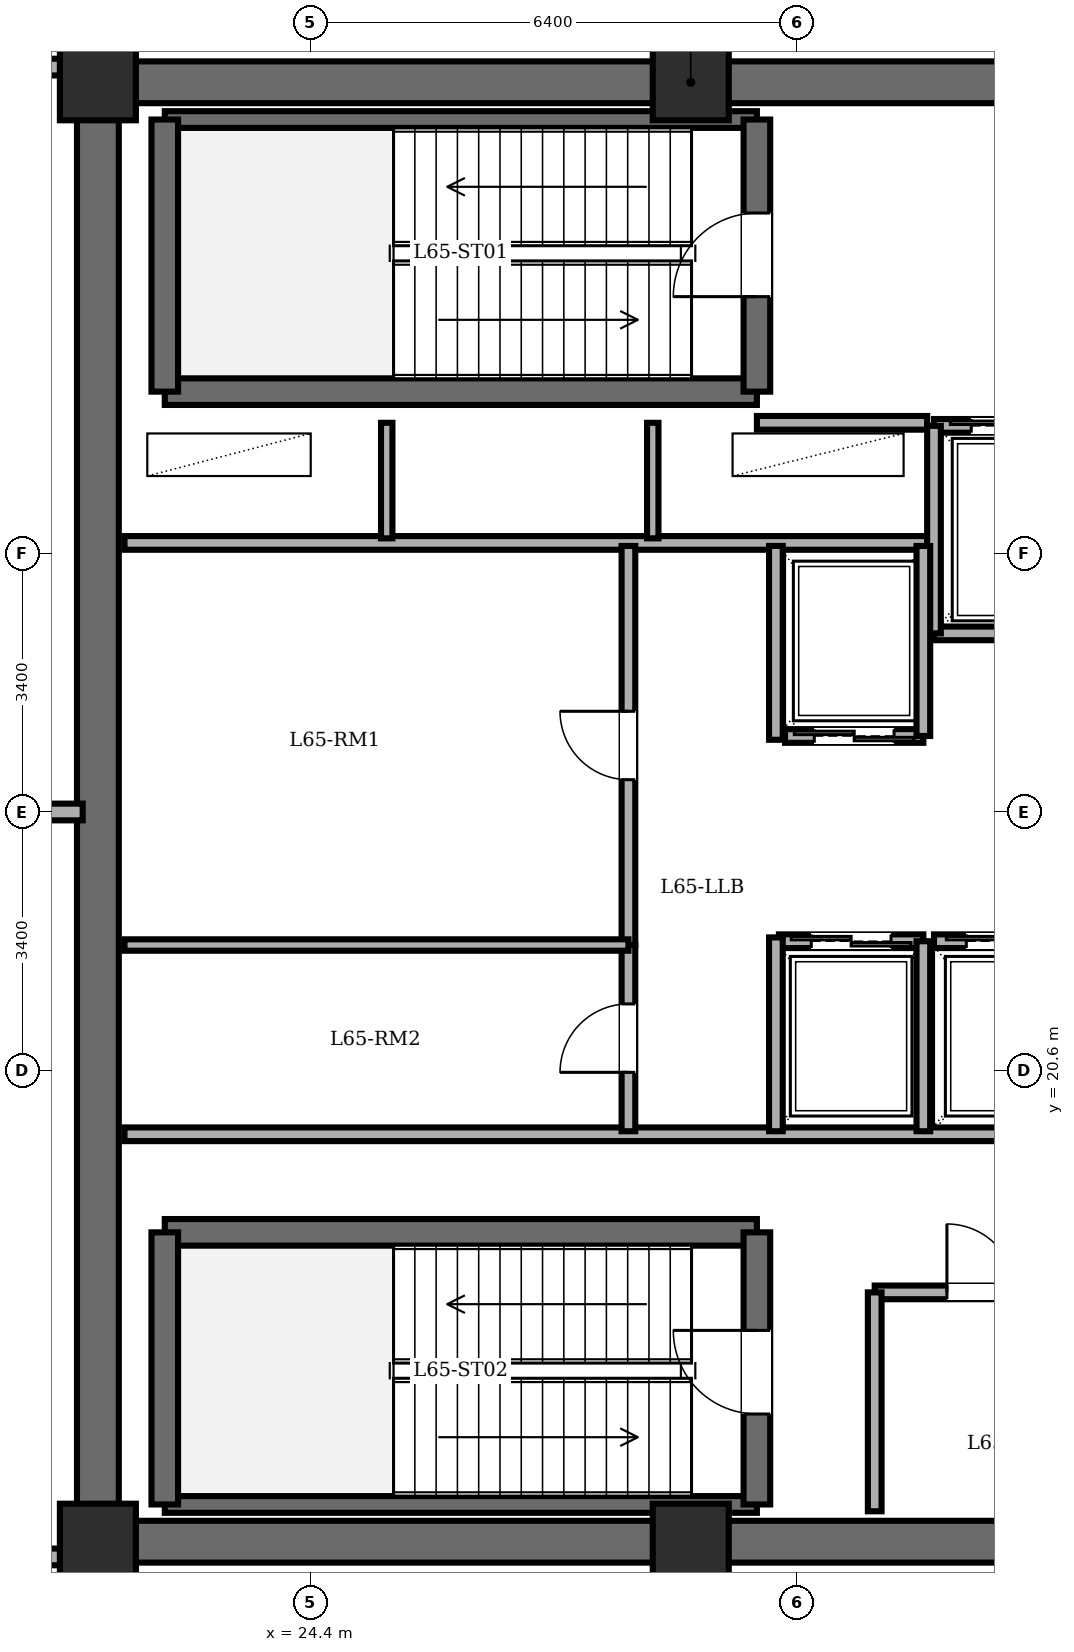
"""IFC4 building model, lengths in metres.
Left out: names, types, materials, properties, quantities, classifications, styles, units other than length and angle.
Written with IfcOpenShell. Run it as: python <this file> out.ifc"""

import sys

from ifc_helpers import new_model, si_unit, direction, frame, frame_2d, origin, origin_2d, place, context, subcontext, project, spatial, rectangle, extrude, element, fill, save


model = new_model("IFC4")
c1 = context("Model", 3, precision=1e-05, world=origin(), true_north=direction((0.0, 1.0)))
c2 = subcontext(c1, "Body", "Model", "MODEL_VIEW")
j1 = project(units=[si_unit("LENGTHUNIT", "METRE"), si_unit("PLANEANGLEUNIT", "RADIAN")], contexts=[c1])
p1 = place(None, origin())
s1 = spatial("IfcSite", under=j1, at=p1, CompositionType="ELEMENT")
p2 = place(p1, origin())
s2 = spatial("IfcBuilding", under=s1, at=p2, CompositionType="ELEMENT")
p3 = place(p2, frame((0.0, 0.0, 248.1)))
s3 = spatial("IfcBuildingStorey", under=s2, at=p3, CompositionType="ELEMENT", Elevation=248.1)
for number, where, z_axis, x_axis in (
    (1, (21.6, 14.4, 0.0), (0.0, 0.0, 1.0), (1.0, 0.0, 0.0)),
    (2, (29.4, 14.4, 0.0), (0.0, 0.0, 1.0), (1.0, 0.0, 0.0)),
    (3, (29.4, 33.6, 0.0), (0.0, 0.0, 1.0), (1.0, 0.0, 0.0)),
    (4, (21.6, 33.6, 0.0), (0.0, 0.0, 1.0), (1.0, 0.0, 0.0)),
):
    element("IfcColumn", number, at=place(p3, frame(where, z_axis=z_axis, x_axis=x_axis)), inside=s3, PredefinedType="COLUMN", context=c2, shape_type="SweptSolid", body=[
        extrude(rectangle(XDim=1.0, YDim=1.0, at=origin_2d()), origin(), (0.0, 0.0, 1.0), 5.6),
    ])
p4 = place(p3, frame((21.6, 14.4, 0.0), z_axis=(0.0, 0.0, 1.0), x_axis=(0.0, 1.0, 0.0)))
e5 = element("IfcWall", 5, at=p4, inside=s3, PredefinedType="SHEAR", context=c2, shape_type="SweptSolid", body=[
    extrude(rectangle(XDim=19.2, YDim=0.55, at=frame_2d((9.6, 0.0))), origin(), (0.0, 0.0, 1.0), 5.36),
])
for number, where, z_axis, x_axis in (
    (6, (21.6, 33.6, 0.0), (0.0, 0.0, 1.0), (1.0, 0.0, 0.0)),
    (7, (37.2, 14.4, 0.0), (0.0, 0.0, 1.0), (-1.0, 0.0, 0.0)),
):
    element("IfcWall", number, at=place(p3, frame(where, z_axis=z_axis, x_axis=x_axis)), inside=s3, PredefinedType="SHEAR", context=c2, shape_type="SweptSolid", body=[
        extrude(rectangle(XDim=15.6, YDim=0.55, at=frame_2d((7.8, 0.0))), origin(), (0.0, 0.0, 1.0), 5.36),
    ])
p5 = place(p3, frame((22.48, 29.53, 0.0), z_axis=(0.0, 0.0, 1.0), x_axis=(1.0, 0.0, 0.0)))
e8 = element("IfcWall", 8, at=p5, inside=s3, PredefinedType="SOLIDWALL", context=c2, shape_type="SweptSolid", body=[
    extrude(rectangle(XDim=7.79, YDim=0.35, at=frame_2d((3.895, 0.0))), origin(), (0.0, 0.0, 1.0), 5.36),
])
p6 = place(p3, frame((22.48, 33.11, 0.0), z_axis=(0.0, 0.0, 1.0), x_axis=(1.0, 0.0, 0.0)))
e9 = element("IfcWall", 9, at=p6, inside=s3, PredefinedType="PARTITIONING", context=c2, shape_type="SweptSolid", body=[
    extrude(rectangle(XDim=7.79, YDim=0.22, at=frame_2d((3.895, 0.0))), origin(), (0.0, 0.0, 1.0), 5.36),
])
p7 = place(p3, frame((22.48, 29.53, 0.0), z_axis=(0.0, 0.0, 1.0), x_axis=(0.0, 1.0, 0.0)))
e10 = element("IfcWall", 10, at=p7, inside=s3, PredefinedType="SOLIDWALL", context=c2, shape_type="SweptSolid", body=[
    extrude(rectangle(XDim=3.58, YDim=0.35, at=frame_2d((1.79, 0.0))), origin(), (0.0, 0.0, 1.0), 5.36),
])
p8 = place(p3, frame((30.27, 29.53, 0.0), z_axis=(0.0, 0.0, 1.0), x_axis=(0.0, 1.0, 0.0)))
e11 = element("IfcWall", 11, at=p8, inside=s3, PredefinedType="SOLIDWALL", context=c2, shape_type="SweptSolid", body=[
    extrude(rectangle(XDim=3.58, YDim=0.35, at=frame_2d((1.79, 0.0))), origin(), (0.0, 0.0, 1.0), 5.36),
])
p9 = place(p8, frame((1.25, 0.0, 0.0)))
e12 = element("IfcOpeningElement", 12, at=p9, cuts=e11, PredefinedType="OPENING", context=c2, shape_type="SweptSolid", body=[
    extrude(rectangle(XDim=1.1, YDim=2.15, at=frame_2d((0.55, 1.075))), frame((0.0, 0.185, 0.0), z_axis=(0.0, -1.0, 0.0), x_axis=(1.0, 0.0, 0.0)), (0.0, 0.0, 1.0), 0.37),
])
p10 = place(p3, frame((22.48, 18.47, 0.0), z_axis=(0.0, 0.0, 1.0), x_axis=(1.0, 0.0, 0.0)))
e13 = element("IfcWall", 13, at=p10, inside=s3, PredefinedType="SOLIDWALL", context=c2, shape_type="SweptSolid", body=[
    extrude(rectangle(XDim=7.79, YDim=0.35, at=frame_2d((3.895, 0.0))), origin(), (0.0, 0.0, 1.0), 5.36),
])
p11 = place(p3, frame((22.48, 14.89, 0.0), z_axis=(0.0, 0.0, 1.0), x_axis=(1.0, 0.0, 0.0)))
e14 = element("IfcWall", 14, at=p11, inside=s3, PredefinedType="PARTITIONING", context=c2, shape_type="SweptSolid", body=[
    extrude(rectangle(XDim=7.79, YDim=0.22, at=frame_2d((3.895, 0.0))), origin(), (0.0, 0.0, 1.0), 5.36),
])
p12 = place(p3, frame((22.48, 14.89, 0.0), z_axis=(0.0, 0.0, 1.0), x_axis=(0.0, 1.0, 0.0)))
e15 = element("IfcWall", 15, at=p12, inside=s3, PredefinedType="SOLIDWALL", context=c2, shape_type="SweptSolid", body=[
    extrude(rectangle(XDim=3.58, YDim=0.35, at=frame_2d((1.79, 0.0))), origin(), (0.0, 0.0, 1.0), 5.36),
])
p13 = place(p3, frame((30.27, 14.89, 0.0), z_axis=(0.0, 0.0, 1.0), x_axis=(0.0, 1.0, 0.0)))
e16 = element("IfcWall", 16, at=p13, inside=s3, PredefinedType="SOLIDWALL", context=c2, shape_type="SweptSolid", body=[
    extrude(rectangle(XDim=3.58, YDim=0.35, at=frame_2d((1.79, 0.0))), origin(), (0.0, 0.0, 1.0), 5.36),
])
p14 = place(p13, frame((1.19, 0.0, 0.0)))
e17 = element("IfcOpeningElement", 17, at=p14, cuts=e16, PredefinedType="OPENING", context=c2, shape_type="SweptSolid", body=[
    extrude(rectangle(XDim=1.1, YDim=2.15, at=frame_2d((0.55, 1.075))), frame((0.0, 0.185, 0.0), z_axis=(0.0, -1.0, 0.0), x_axis=(1.0, 0.0, 0.0)), (0.0, 0.0, 1.0), 0.37),
])
p15 = place(p3, frame((30.27, 29.12, 0.0), z_axis=(0.0, 0.0, 1.0), x_axis=(1.0, 0.0, 0.0)))
e18 = element("IfcWall", 18, at=p15, inside=s3, PredefinedType="PARTITIONING", context=c2, shape_type="SweptSolid", body=[
    extrude(rectangle(XDim=2.24, YDim=0.18, at=frame_2d((1.12, 0.0))), origin(), (0.0, 0.0, 1.0), 5.36),
])
p16 = place(p3, frame((21.95, 27.54, 0.0), z_axis=(0.0, 0.0, 1.0), x_axis=(1.0, 0.0, 0.0)))
e19 = element("IfcWall", 19, at=p16, inside=s3, PredefinedType="PARTITIONING", context=c2, shape_type="SweptSolid", body=[
    extrude(rectangle(XDim=10.56, YDim=0.18, at=frame_2d((5.28, 0.0))), origin(), (0.0, 0.0, 1.0), 5.36),
])
for number, where, z_axis, x_axis in (
    (20, (25.4, 27.6, 0.0), (0.0, 0.0, 1.0), (0.0, 1.0, 0.0)),
    (21, (28.9, 27.6, 0.0), (0.0, 0.0, 1.0), (0.0, 1.0, 0.0)),
):
    element("IfcWall", number, at=place(p3, frame(where, z_axis=z_axis, x_axis=x_axis)), inside=s3, PredefinedType="PARTITIONING", context=c2, shape_type="SweptSolid", body=[
        extrude(rectangle(XDim=1.52, YDim=0.15, at=frame_2d((0.76, 0.0))), origin(), (0.0, 0.0, 1.0), 5.36),
    ])
p17 = place(p3, frame((21.95, 19.76, 0.0), z_axis=(0.0, 0.0, 1.0), x_axis=(1.0, 0.0, 0.0)))
e22 = element("IfcWall", 22, at=p17, inside=s3, PredefinedType="PARTITIONING", context=c2, shape_type="SweptSolid", body=[
    extrude(rectangle(XDim=14.87, YDim=0.18, at=frame_2d((7.435, 0.0))), origin(), (0.0, 0.0, 1.0), 5.36),
])
p18 = place(p3, frame((31.82, 17.68, 0.0), z_axis=(0.0, 0.0, 1.0), x_axis=(1.0, 0.0, 0.0)))
e23 = element("IfcWall", 23, at=p18, inside=s3, PredefinedType="PARTITIONING", context=c2, shape_type="SweptSolid", body=[
    extrude(rectangle(XDim=2.66, YDim=0.18, at=frame_2d((1.33, 0.0))), origin(), (0.0, 0.0, 1.0), 5.36),
])
p19 = place(p18, frame((0.95, 0.0, 0.0)))
e24 = element("IfcOpeningElement", 24, at=p19, cuts=e23, PredefinedType="OPENING", context=c2, shape_type="SweptSolid", body=[
    extrude(rectangle(XDim=0.9, YDim=2.05, at=frame_2d((0.45, 1.025))), frame((0.0, 0.1, 0.0), z_axis=(0.0, -1.0, 0.0), x_axis=(1.0, 0.0, 0.0)), (0.0, 0.0, 1.0), 0.2),
])
p20 = place(p3, frame((31.82, 14.8, 0.0), z_axis=(0.0, 0.0, 1.0), x_axis=(0.0, 1.0, 0.0)))
e25 = element("IfcWall", 25, at=p20, inside=s3, PredefinedType="PARTITIONING", context=c2, shape_type="SweptSolid", body=[
    extrude(rectangle(XDim=2.88, YDim=0.18, at=frame_2d((1.44, 0.0))), origin(), (0.0, 0.0, 1.0), 5.36),
])
p21 = place(p3, frame((32.6, 29.08, 0.0), z_axis=(0.0, 0.0, 1.0), x_axis=(1.0, 0.0, 0.0)))
e26 = element("IfcWall", 26, at=p21, inside=s3, PredefinedType="PARTITIONING", context=c2, shape_type="SweptSolid", body=[
    extrude(rectangle(XDim=2.08, YDim=0.18, at=frame_2d((1.04, 0.0))), origin(), (0.0, 0.0, 1.0), 5.36),
])
p22 = place(p21, frame((0.49, 0.0, 0.0)))
e27 = element("IfcOpeningElement", 27, at=p22, cuts=e26, PredefinedType="OPENING", context=c2, shape_type="SweptSolid", body=[
    extrude(rectangle(XDim=1.1, YDim=2.2, at=frame_2d((0.55, 1.1))), frame((0.0, 0.1, 0.0), z_axis=(0.0, -1.0, 0.0), x_axis=(1.0, 0.0, 0.0)), (0.0, 0.0, 1.0), 0.2),
])
p23 = place(p3, frame((34.68, 26.35, 0.0), z_axis=(0.0, 0.0, 1.0), x_axis=(-1.0, 0.0, 0.0)))
e28 = element("IfcWall", 28, at=p23, inside=s3, PredefinedType="PARTITIONING", context=c2, shape_type="SweptSolid", body=[
    extrude(rectangle(XDim=2.08, YDim=0.18, at=frame_2d((1.04, 0.0))), origin(), (0.0, 0.0, 1.0), 5.36),
])
p24 = place(p3, frame((32.6, 29.08, 0.0), z_axis=(0.0, 0.0, 1.0), x_axis=(0.0, -1.0, 0.0)))
e29 = element("IfcWall", 29, at=p24, inside=s3, PredefinedType="PARTITIONING", context=c2, shape_type="SweptSolid", body=[
    extrude(rectangle(XDim=2.73, YDim=0.18, at=frame_2d((1.365, 0.0))), origin(), (0.0, 0.0, 1.0), 5.36),
])
p25 = place(p3, frame((32.46, 25.0, 0.0), z_axis=(0.0, 0.0, 1.0), x_axis=(-1.0, 0.0, 0.0)))
e30 = element("IfcWall", 30, at=p25, inside=s3, PredefinedType="PARTITIONING", context=c2, shape_type="SweptSolid", body=[
    extrude(rectangle(XDim=1.82, YDim=0.18, at=frame_2d((0.91, 0.0))), origin(), (0.0, 0.0, 1.0), 5.36),
])
p26 = place(p25, frame((0.385, 0.0, 0.0)))
e31 = element("IfcOpeningElement", 31, at=p26, cuts=e30, PredefinedType="OPENING", context=c2, shape_type="SweptSolid", body=[
    extrude(rectangle(XDim=1.05, YDim=2.2, at=frame_2d((0.525, 1.1))), frame((0.0, 0.1, 0.0), z_axis=(0.0, -1.0, 0.0), x_axis=(1.0, 0.0, 0.0)), (0.0, 0.0, 1.0), 0.2),
])
p27 = place(p3, frame((32.46, 25.0, 0.0), z_axis=(0.0, 0.0, 1.0), x_axis=(0.0, 1.0, 0.0)))
e32 = element("IfcWall", 32, at=p27, inside=s3, PredefinedType="PARTITIONING", context=c2, shape_type="SweptSolid", body=[
    extrude(rectangle(XDim=2.5, YDim=0.18, at=frame_2d((1.25, 0.0))), origin(), (0.0, 0.0, 1.0), 5.36),
])
p28 = place(p3, frame((30.56, 22.3, 0.0), z_axis=(0.0, 0.0, 1.0), x_axis=(1.0, 0.0, 0.0)))
e33 = element("IfcWall", 33, at=p28, inside=s3, PredefinedType="PARTITIONING", context=c2, shape_type="SweptSolid", body=[
    extrude(rectangle(XDim=1.9, YDim=0.18, at=frame_2d((0.95, 0.0))), origin(), (0.0, 0.0, 1.0), 5.36),
])
p29 = place(p28, frame((0.425, 0.0, 0.0)))
e34 = element("IfcOpeningElement", 34, at=p29, cuts=e33, PredefinedType="OPENING", context=c2, shape_type="SweptSolid", body=[
    extrude(rectangle(XDim=1.05, YDim=2.2, at=frame_2d((0.525, 1.1))), frame((0.0, 0.1, 0.0), z_axis=(0.0, -1.0, 0.0), x_axis=(1.0, 0.0, 0.0)), (0.0, 0.0, 1.0), 0.2),
])
p30 = place(p3, frame((32.46, 19.8, 0.0), z_axis=(0.0, 0.0, 1.0), x_axis=(0.0, 1.0, 0.0)))
e35 = element("IfcWall", 35, at=p30, inside=s3, PredefinedType="PARTITIONING", context=c2, shape_type="SweptSolid", body=[
    extrude(rectangle(XDim=2.5, YDim=0.18, at=frame_2d((1.25, 0.0))), origin(), (0.0, 0.0, 1.0), 5.36),
])
p31 = place(p3, frame((32.6, 22.3, 0.0), z_axis=(0.0, 0.0, 1.0), x_axis=(1.0, 0.0, 0.0)))
e36 = element("IfcWall", 36, at=p31, inside=s3, PredefinedType="PARTITIONING", context=c2, shape_type="SweptSolid", body=[
    extrude(rectangle(XDim=1.9, YDim=0.18, at=frame_2d((0.95, 0.0))), origin(), (0.0, 0.0, 1.0), 5.36),
])
p32 = place(p31, frame((0.425, 0.0, 0.0)))
e37 = element("IfcOpeningElement", 37, at=p32, cuts=e36, PredefinedType="OPENING", context=c2, shape_type="SweptSolid", body=[
    extrude(rectangle(XDim=1.05, YDim=2.2, at=frame_2d((0.525, 1.1))), frame((0.0, 0.1, 0.0), z_axis=(0.0, -1.0, 0.0), x_axis=(1.0, 0.0, 0.0)), (0.0, 0.0, 1.0), 0.2),
])
for number, where, z_axis, x_axis in (
    (38, (30.52, 24.95, 0.0), (0.0, 0.0, 1.0), (0.0, 1.0, 0.0)),
    (39, (30.52, 19.8, 0.0), (0.0, 0.0, 1.0), (0.0, 1.0, 0.0)),
):
    element("IfcWall", number, at=place(p3, frame(where, z_axis=z_axis, x_axis=x_axis)), inside=s3, PredefinedType="PARTITIONING", context=c2, shape_type="SweptSolid", body=[
        extrude(rectangle(XDim=2.55, YDim=0.18, at=frame_2d((1.275, 0.0))), origin(), (0.0, 0.0, 1.0), 5.36),
    ])
p33 = place(p3, frame((28.58, 22.25, 0.0), z_axis=(0.0, 0.0, 1.0), x_axis=(0.0, 1.0, 0.0)))
e40 = element("IfcWall", 40, at=p33, inside=s3, PredefinedType="PARTITIONING", context=c2, shape_type="SweptSolid", body=[
    extrude(rectangle(XDim=5.25, YDim=0.18, at=frame_2d((2.625, 0.0))), origin(), (0.0, 0.0, 1.0), 5.36),
])
p34 = place(p33, frame((2.175, 0.0, 0.0)))
e41 = element("IfcOpeningElement", 41, at=p34, cuts=e40, PredefinedType="OPENING", context=c2, shape_type="SweptSolid", body=[
    extrude(rectangle(XDim=0.9, YDim=2.05, at=frame_2d((0.45, 1.025))), frame((0.0, 0.1, 0.0), z_axis=(0.0, -1.0, 0.0), x_axis=(1.0, 0.0, 0.0)), (0.0, 0.0, 1.0), 0.2),
])
p35 = place(p3, frame((28.58, 19.8, 0.0), z_axis=(0.0, 0.0, 1.0), x_axis=(0.0, 1.0, 0.0)))
e42 = element("IfcWall", 42, at=p35, inside=s3, PredefinedType="PARTITIONING", context=c2, shape_type="SweptSolid", body=[
    extrude(rectangle(XDim=2.45, YDim=0.18, at=frame_2d((1.225, 0.0))), origin(), (0.0, 0.0, 1.0), 5.36),
])
p36 = place(p35, frame((0.775, 0.0, 0.0)))
e43 = element("IfcOpeningElement", 43, at=p36, cuts=e42, PredefinedType="OPENING", context=c2, shape_type="SweptSolid", body=[
    extrude(rectangle(XDim=0.9, YDim=2.05, at=frame_2d((0.45, 1.025))), frame((0.0, 0.1, 0.0), z_axis=(0.0, -1.0, 0.0), x_axis=(1.0, 0.0, 0.0)), (0.0, 0.0, 1.0), 0.2),
])
p37 = place(p3, frame((21.95, 22.25, 0.0), z_axis=(0.0, 0.0, 1.0), x_axis=(1.0, 0.0, 0.0)))
e44 = element("IfcWall", 44, at=p37, inside=s3, PredefinedType="PARTITIONING", context=c2, shape_type="SweptSolid", body=[
    extrude(rectangle(XDim=6.63, YDim=0.15, at=frame_2d((3.315, 0.0))), origin(), (0.0, 0.0, 1.0), 5.36),
])
p38 = place(p3, frame((17.2, 14.2, 0.0), z_axis=(0.0, 0.0, 1.0), x_axis=(1.0, 0.0, 0.0)))
e45 = element("IfcWall", 45, at=p38, inside=s3, PredefinedType="PARTITIONING", context=c2, shape_type="SweptSolid", body=[
    extrude(rectangle(XDim=4.2, YDim=0.22, at=frame_2d((2.1, 0.0))), origin(), (0.0, 0.0, 1.0), 5.36),
])
p39 = place(p38, frame((1.4, 0.0, 0.0)))
e46 = element("IfcOpeningElement", 46, at=p39, cuts=e45, PredefinedType="OPENING", context=c2, shape_type="SweptSolid", body=[
    extrude(rectangle(XDim=1.4, YDim=2.25, at=frame_2d((0.7, 1.125))), frame((0.0, 0.12, 0.0), z_axis=(0.0, -1.0, 0.0), x_axis=(1.0, 0.0, 0.0)), (0.0, 0.0, 1.0), 0.24),
])
p40 = place(p3, frame((17.2, 24.0, 0.0), z_axis=(0.0, 0.0, 1.0), x_axis=(1.0, 0.0, 0.0)))
e47 = element("IfcWall", 47, at=p40, inside=s3, PredefinedType="PARTITIONING", context=c2, shape_type="SweptSolid", body=[
    extrude(rectangle(XDim=4.2, YDim=0.22, at=frame_2d((2.1, 0.0))), origin(), (0.0, 0.0, 1.0), 5.36),
])
p41 = place(p3, frame((17.2, 33.8, 0.0), z_axis=(0.0, 0.0, 1.0), x_axis=(1.0, 0.0, 0.0)))
e48 = element("IfcWall", 48, at=p41, inside=s3, PredefinedType="PARTITIONING", context=c2, shape_type="SweptSolid", body=[
    extrude(rectangle(XDim=4.2, YDim=0.22, at=frame_2d((2.1, 0.0))), origin(), (0.0, 0.0, 1.0), 5.36),
])
p42 = place(p41, frame((1.4, 0.0, 0.0)))
e49 = element("IfcOpeningElement", 49, at=p42, cuts=e48, PredefinedType="OPENING", context=c2, shape_type="SweptSolid", body=[
    extrude(rectangle(XDim=1.4, YDim=2.25, at=frame_2d((0.7, 1.125))), frame((0.0, 0.12, 0.0), z_axis=(0.0, -1.0, 0.0), x_axis=(1.0, 0.0, 0.0)), (0.0, 0.0, 1.0), 0.24),
])
p43 = place(p9, origin())
e50 = element("IfcDoor", 50, at=p43, inside=s3, OperationType="SINGLE_SWING_LEFT", PredefinedType="DOOR", context=c2, shape_type="SweptSolid", body=[
    extrude(rectangle(XDim=1.1, YDim=2.15, at=frame_2d((0.55, 1.075))), frame((0.0, 0.025, 0.0), z_axis=(0.0, -1.0, 0.0), x_axis=(1.0, 0.0, 0.0)), (0.0, 0.0, 1.0), 0.05),
])
fill(e12, e50)
p44 = place(p14, origin())
e51 = element("IfcDoor", 51, at=p44, inside=s3, OperationType="SINGLE_SWING_RIGHT", PredefinedType="DOOR", context=c2, shape_type="SweptSolid", body=[
    extrude(rectangle(XDim=1.1, YDim=2.15, at=frame_2d((0.55, 1.075))), frame((0.0, 0.025, 0.0), z_axis=(0.0, -1.0, 0.0), x_axis=(1.0, 0.0, 0.0)), (0.0, 0.0, 1.0), 0.05),
])
fill(e17, e51)
p45 = place(p19, origin())
e52 = element("IfcDoor", 52, at=p45, inside=s3, OperationType="SINGLE_SWING_LEFT", PredefinedType="DOOR", context=c2, shape_type="SweptSolid", body=[
    extrude(rectangle(XDim=0.9, YDim=2.05, at=frame_2d((0.45, 1.025))), frame((0.0, 0.025, 0.0), z_axis=(0.0, -1.0, 0.0), x_axis=(1.0, 0.0, 0.0)), (0.0, 0.0, 1.0), 0.05),
])
fill(e24, e52)
p46 = place(p22, origin())
e53 = element("IfcDoor", 53, at=p46, inside=s3, OperationType="DOUBLE_DOOR_SLIDING", PredefinedType="DOOR", context=c2, shape_type="SweptSolid", body=[
    extrude(rectangle(XDim=1.1, YDim=2.2, at=frame_2d((0.55, 1.1))), frame((0.0, 0.025, 0.0), z_axis=(0.0, -1.0, 0.0), x_axis=(1.0, 0.0, 0.0)), (0.0, 0.0, 1.0), 0.05),
])
fill(e27, e53)
p47 = place(p26, origin())
e54 = element("IfcDoor", 54, at=p47, inside=s3, OperationType="DOUBLE_DOOR_SLIDING", PredefinedType="DOOR", context=c2, shape_type="SweptSolid", body=[
    extrude(rectangle(XDim=1.05, YDim=2.2, at=frame_2d((0.525, 1.1))), frame((0.0, 0.025, 0.0), z_axis=(0.0, -1.0, 0.0), x_axis=(1.0, 0.0, 0.0)), (0.0, 0.0, 1.0), 0.05),
])
fill(e31, e54)
p48 = place(p29, origin())
e55 = element("IfcDoor", 55, at=p48, inside=s3, OperationType="DOUBLE_DOOR_SLIDING", PredefinedType="DOOR", context=c2, shape_type="SweptSolid", body=[
    extrude(rectangle(XDim=1.05, YDim=2.2, at=frame_2d((0.525, 1.1))), frame((0.0, 0.025, 0.0), z_axis=(0.0, -1.0, 0.0), x_axis=(1.0, 0.0, 0.0)), (0.0, 0.0, 1.0), 0.05),
])
fill(e34, e55)
p49 = place(p32, origin())
e56 = element("IfcDoor", 56, at=p49, inside=s3, OperationType="DOUBLE_DOOR_SLIDING", PredefinedType="DOOR", context=c2, shape_type="SweptSolid", body=[
    extrude(rectangle(XDim=1.05, YDim=2.2, at=frame_2d((0.525, 1.1))), frame((0.0, 0.025, 0.0), z_axis=(0.0, -1.0, 0.0), x_axis=(1.0, 0.0, 0.0)), (0.0, 0.0, 1.0), 0.05),
])
fill(e37, e56)
p50 = place(p34, origin())
e57 = element("IfcDoor", 57, at=p50, inside=s3, OperationType="SINGLE_SWING_RIGHT", PredefinedType="DOOR", context=c2, shape_type="SweptSolid", body=[
    extrude(rectangle(XDim=0.9, YDim=2.05, at=frame_2d((0.45, 1.025))), frame((0.0, 0.025, 0.0), z_axis=(0.0, -1.0, 0.0), x_axis=(1.0, 0.0, 0.0)), (0.0, 0.0, 1.0), 0.05),
])
fill(e41, e57)
p51 = place(p36, origin())
e58 = element("IfcDoor", 58, at=p51, inside=s3, OperationType="SINGLE_SWING_LEFT", PredefinedType="DOOR", context=c2, shape_type="SweptSolid", body=[
    extrude(rectangle(XDim=0.9, YDim=2.05, at=frame_2d((0.45, 1.025))), frame((0.0, 0.025, 0.0), z_axis=(0.0, -1.0, 0.0), x_axis=(1.0, 0.0, 0.0)), (0.0, 0.0, 1.0), 0.05),
])
fill(e43, e58)
save(model, sys.argv[1])
